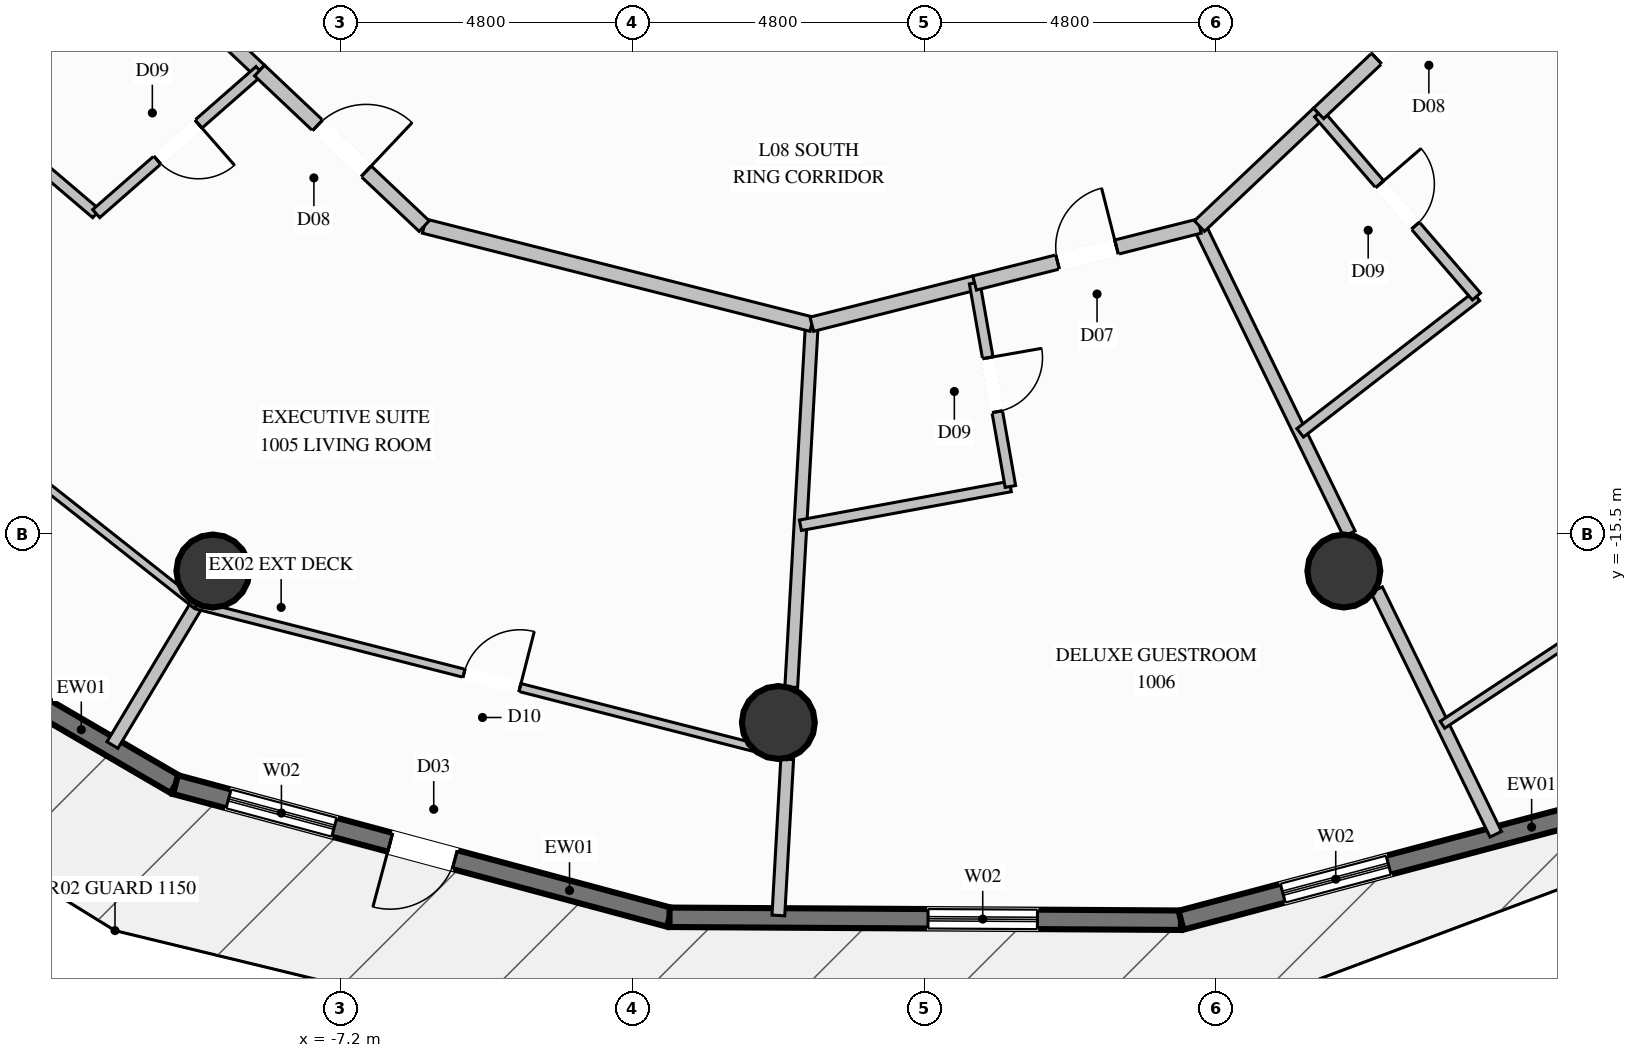
"""IFC4 building model, lengths in metres.
Left out: names, types, materials, properties, quantities, classifications, styles, units other than length and angle.
Written with IfcOpenShell. Run it as: python <this file> out.ifc"""

import sys

from ifc_helpers import new_model, si_unit, direction, frame, frame_2d, origin, origin_2d, place, context, subcontext, project, spatial, rectangle, circle, extrude, element, fill, save


model = new_model("IFC4")
c1 = context("Model", 3, precision=1e-05, world=origin(), true_north=direction((0.0, 1.0)))
c2 = subcontext(c1, "Body", "Model", "MODEL_VIEW")
j1 = project(units=[si_unit("LENGTHUNIT", "METRE"), si_unit("PLANEANGLEUNIT", "RADIAN")], contexts=[c1])
p1 = place(None, origin())
s1 = spatial("IfcSite", under=j1, at=p1, CompositionType="ELEMENT")
p2 = place(p1, origin())
s2 = spatial("IfcBuilding", under=s1, at=p2, CompositionType="ELEMENT")
p3 = place(p2, frame((0.0, 0.0, 39.2)))
s3 = spatial("IfcBuildingStorey", under=s2, at=p3, CompositionType="ELEMENT", Elevation=39.2)
for number, where, z_axis, x_axis in (
    (1, (-9.3, -16.108, 0.0), (0.0, 0.0, 1.0), (1.0, 0.0, 0.0)),
    (2, (0.0, -18.6, 0.0), (0.0, 0.0, 1.0), (1.0, 0.0, 0.0)),
    (3, (9.3, -16.108, 0.0), (0.0, 0.0, 1.0), (1.0, 0.0, 0.0)),
):
    element("IfcColumn", number, at=place(p3, frame(where, z_axis=z_axis, x_axis=x_axis)), inside=s3, PredefinedType="COLUMN", context=c2, shape_type="SweptSolid", body=[
        extrude(circle(Radius=0.6, at=origin_2d()), origin(), (0.0, 0.0, 1.0), 3.6),
    ])
p4 = place(p3, frame((-9.915, -19.621, 0.0), z_axis=(0.0, 0.0, 1.0), x_axis=(-0.864004822612, 0.503483531512, 0.0)))
e4 = element("IfcWall", 4, at=p4, inside=s3, PredefinedType="SOLIDWALL", context=c2, shape_type="SweptSolid", body=[
    extrude(rectangle(XDim=8.149, YDim=0.32, at=frame_2d((4.075, 0.0))), origin(), (0.0, 0.0, 1.0), 3.34),
])
p5 = place(p4, frame((3.836, 0.0, 0.35)))
e5 = element("IfcOpeningElement", 5, at=p5, cuts=e4, PredefinedType="OPENING", context=c2, shape_type="SweptSolid", body=[
    extrude(rectangle(XDim=1.8, YDim=2.6, at=frame_2d((0.9, 1.3))), frame((0.0, 0.17, 0.0), z_axis=(0.0, -1.0, 0.0), x_axis=(1.0, 0.0, 0.0)), (0.0, 0.0, 1.0), 0.34),
])
p6 = place(p3, frame((-1.79, -21.803, 0.0), z_axis=(0.0, 0.0, 1.0), x_axis=(-0.965783113011, 0.259351072145, 0.0)))
e6 = element("IfcWall", 6, at=p6, inside=s3, PredefinedType="SOLIDWALL", context=c2, shape_type="SweptSolid", body=[
    extrude(rectangle(XDim=8.413, YDim=0.32, at=frame_2d((4.207, 0.0))), origin(), (0.0, 0.0, 1.0), 3.34),
])
p7 = place(p6, frame((5.709, 0.0, 0.35)))
e7 = element("IfcOpeningElement", 7, at=p7, cuts=e6, PredefinedType="OPENING", context=c2, shape_type="SweptSolid", body=[
    extrude(rectangle(XDim=1.8, YDim=2.6, at=frame_2d((0.9, 1.3))), frame((0.0, 0.17, 0.0), z_axis=(0.0, -1.0, 0.0), x_axis=(1.0, 0.0, 0.0)), (0.0, 0.0, 1.0), 0.34),
])
p8 = place(p6, frame((3.656, 0.0, 0.0)))
e8 = element("IfcOpeningElement", 8, at=p8, cuts=e6, PredefinedType="OPENING", context=c2, shape_type="SweptSolid", body=[
    extrude(rectangle(XDim=1.1, YDim=2.2, at=frame_2d((0.55, 1.1))), frame((0.0, 0.17, 0.0), z_axis=(0.0, -1.0, 0.0), x_axis=(1.0, 0.0, 0.0)), (0.0, 0.0, 1.0), 0.34),
])
p9 = place(p3, frame((6.622, -21.851, 0.0), z_axis=(0.0, 0.0, 1.0), x_axis=(-0.999983655859, 0.005717343284, 0.0)))
e9 = element("IfcWall", 9, at=p9, inside=s3, PredefinedType="SOLIDWALL", context=c2, shape_type="SweptSolid", body=[
    extrude(rectangle(XDim=8.412, YDim=0.32, at=frame_2d((4.206, 0.0))), origin(), (0.0, 0.0, 1.0), 3.34),
])
p10 = place(p9, frame((2.361, 0.0, 0.35)))
e10 = element("IfcOpeningElement", 10, at=p10, cuts=e9, PredefinedType="OPENING", context=c2, shape_type="SweptSolid", body=[
    extrude(rectangle(XDim=1.8, YDim=2.6, at=frame_2d((0.9, 1.3))), frame((0.0, 0.17, 0.0), z_axis=(0.0, -1.0, 0.0), x_axis=(1.0, 0.0, 0.0)), (0.0, 0.0, 1.0), 0.34),
])
p11 = place(p3, frame((14.499, -19.76, 0.0), z_axis=(0.0, 0.0, 1.0), x_axis=(-0.966523209468, -0.256579199389, 0.0)))
e11 = element("IfcWall", 11, at=p11, inside=s3, PredefinedType="SOLIDWALL", context=c2, shape_type="SweptSolid", body=[
    extrude(rectangle(XDim=8.15, YDim=0.32, at=frame_2d((4.075, 0.0))), origin(), (0.0, 0.0, 1.0), 3.34),
])
p12 = place(p11, frame((4.617, 0.0, 0.35)))
e12 = element("IfcOpeningElement", 12, at=p12, cuts=e11, PredefinedType="OPENING", context=c2, shape_type="SweptSolid", body=[
    extrude(rectangle(XDim=1.8, YDim=2.6, at=frame_2d((0.9, 1.3))), frame((0.0, 0.17, 0.0), z_axis=(0.0, -1.0, 0.0), x_axis=(1.0, 0.0, 0.0)), (0.0, 0.0, 1.0), 0.34),
])
p13 = place(p3, frame((-10.492, -6.025, 0.0), z_axis=(0.0, 0.0, 1.0), x_axis=(-0.86478894661, -0.502135517387, 0.0)))
e13 = element("IfcWall", 13, at=p13, inside=s3, PredefinedType="PARTITIONING", context=c2, shape_type="SweptSolid", body=[
    extrude(rectangle(XDim=5.881, YDim=0.21, at=frame_2d((2.94, 0.0))), origin(), (0.0, 0.0, 1.0), 2.709),
])
p14 = place(p3, frame((0.55, -12.05, 0.0), z_axis=(0.0, 0.0, 1.0), x_axis=(-0.056567082794, -0.998398800652, 0.0)))
e14 = element("IfcWall", 14, at=p14, inside=s3, PredefinedType="PARTITIONING", context=c2, shape_type="SweptSolid", body=[
    extrude(rectangle(XDim=5.978, YDim=0.21, at=frame_2d((2.989, 0.0))), origin(), (0.0, 0.0, 1.0), 3.34),
])
p15 = place(p3, frame((0.145, -19.203, 0.0), z_axis=(0.0, 0.0, 1.0), x_axis=(-0.056336717454, -0.998411825985, 0.0)))
e15 = element("IfcWall", 15, at=p15, inside=s3, PredefinedType="PARTITIONING", context=c2, shape_type="SweptSolid", body=[
    extrude(rectangle(XDim=2.574, YDim=0.21, at=frame_2d((1.287, 0.0))), origin(), (0.0, 0.0, 1.0), 3.34),
])
p16 = place(p3, frame((6.925, -10.436, 0.0), z_axis=(0.0, 0.0, 1.0), x_axis=(0.437992797289, -0.898978481123, 0.0)))
e16 = element("IfcWall", 16, at=p16, inside=s3, PredefinedType="PARTITIONING", context=c2, shape_type="SweptSolid", body=[
    extrude(rectangle(XDim=5.628, YDim=0.21, at=frame_2d((2.814, 0.0))), origin(), (0.0, 0.0, 1.0), 2.709),
])
p17 = place(p3, frame((9.839, -16.415, 0.0), z_axis=(0.0, 0.0, 1.0), x_axis=(0.438066667733, -0.898942486826, 0.0)))
e17 = element("IfcWall", 17, at=p17, inside=s3, PredefinedType="PARTITIONING", context=c2, shape_type="SweptSolid", body=[
    extrude(rectangle(XDim=4.474, YDim=0.21, at=frame_2d((2.237, 0.0))), origin(), (0.0, 0.0, 1.0), 3.34),
])
p18 = place(p3, frame((-10.492, -6.025, 0.0), z_axis=(0.0, 0.0, 1.0), x_axis=(0.726651583854, -0.687006168591, 0.0)))
e18 = element("IfcWall", 18, at=p18, inside=s3, PredefinedType="PARTITIONING", context=c2, shape_type="SweptSolid", body=[
    extrude(rectangle(XDim=2.697, YDim=0.24, at=frame_2d((1.349, 0.0))), origin(), (0.0, 0.0, 1.0), 3.34),
])
p19 = place(p3, frame((-13.863, -7.982, 0.0), z_axis=(0.0, 0.0, 1.0), x_axis=(0.761713672962, -0.647913790888, 0.0)))
e19 = element("IfcWall", 19, at=p19, inside=s3, PredefinedType="PLUMBINGWALL", context=c2, shape_type="SweptSolid", body=[
    extrude(rectangle(XDim=3.471, YDim=0.175, at=frame_2d((1.736, 0.0))), origin(), (0.0, 0.0, 1.0), 3.34),
])
p20 = place(p3, frame((-8.532, -7.878, 0.0), z_axis=(0.0, 0.0, 1.0), x_axis=(-0.752314103663, -0.658804591233, 0.0)))
e20 = element("IfcWall", 20, at=p20, inside=s3, PredefinedType="PLUMBINGWALL", context=c2, shape_type="SweptSolid", body=[
    extrude(rectangle(XDim=3.572, YDim=0.175, at=frame_2d((1.786, 0.0))), origin(), (0.0, 0.0, 1.0), 3.34),
])
p21 = place(p20, frame((1.336, 0.0, 0.0)))
e21 = element("IfcOpeningElement", 21, at=p21, cuts=e20, PredefinedType="OPENING", context=c2, shape_type="SweptSolid", body=[
    extrude(rectangle(XDim=0.9, YDim=2.1, at=frame_2d((0.45, 1.05))), frame((0.0, 0.098, 0.0), z_axis=(0.0, -1.0, 0.0), x_axis=(1.0, 0.0, 0.0)), (0.0, 0.0, 1.0), 0.195),
])
p22 = place(p3, frame((-9.568, -16.666, 0.0), z_axis=(0.0, 0.0, 1.0), x_axis=(-0.514883110299, -0.857260393771, 0.0)))
e22 = element("IfcWall", 22, at=p22, inside=s3, PredefinedType="PARTITIONING", context=c2, shape_type="SweptSolid", body=[
    extrude(rectangle(XDim=2.688, YDim=0.21, at=frame_2d((1.344, 0.0))), origin(), (0.0, 0.0, 1.0), 3.34),
])
p23 = place(p3, frame((-5.825, -10.436, 0.0), z_axis=(0.0, 0.0, 1.0), x_axis=(0.969413132073, -0.245434674331, 0.0)))
e23 = element("IfcWall", 23, at=p23, inside=s3, PredefinedType="PARTITIONING", context=c2, shape_type="SweptSolid", body=[
    extrude(rectangle(XDim=6.576, YDim=0.24, at=frame_2d((3.288, 0.0))), origin(), (0.0, 0.0, 1.0), 3.34),
])
p24 = place(p3, frame((-8.532, -7.878, 0.0), z_axis=(0.0, 0.0, 1.0), x_axis=(0.726816794063, -0.686831382413, 0.0)))
e24 = element("IfcWall", 24, at=p24, inside=s3, PredefinedType="PARTITIONING", context=c2, shape_type="SweptSolid", body=[
    extrude(rectangle(XDim=3.725, YDim=0.24, at=frame_2d((1.862, 0.0))), origin(), (0.0, 0.0, 1.0), 3.34),
])
p25 = place(p24, frame((1.312, 0.0, 0.0)))
e25 = element("IfcOpeningElement", 25, at=p25, cuts=e24, PredefinedType="OPENING", context=c2, shape_type="SweptSolid", body=[
    extrude(rectangle(XDim=1.1, YDim=2.3, at=frame_2d((0.55, 1.15))), frame((0.0, 0.13, 0.0), z_axis=(0.0, -1.0, 0.0), x_axis=(1.0, 0.0, 0.0)), (0.0, 0.0, 1.0), 0.26),
])
p26 = place(p3, frame((-17.729, -10.227, 0.0), z_axis=(0.0, 0.0, 1.0), x_axis=(0.785062483649, -0.61941657773, 0.0)))
e26 = element("IfcWall", 26, at=p26, inside=s3, PredefinedType="PARTITIONING", context=c2, shape_type="SweptSolid", body=[
    extrude(rectangle(XDim=10.395, YDim=0.135, at=frame_2d((5.198, 0.0))), origin(), (0.0, 0.0, 1.0), 2.792),
])
p27 = place(p26, frame((4.723, 0.0, 0.0)))
e27 = element("IfcOpeningElement", 27, at=p27, cuts=e26, PredefinedType="OPENING", context=c2, shape_type="SweptSolid", body=[
    extrude(rectangle(XDim=0.95, YDim=2.1, at=frame_2d((0.475, 1.05))), frame((0.0, 0.078, 0.0), z_axis=(0.0, -1.0, 0.0), x_axis=(1.0, 0.0, 0.0)), (0.0, 0.0, 1.0), 0.155),
])
p28 = place(p3, frame((-9.568, -16.666, 0.0), z_axis=(0.0, 0.0, 1.0), x_axis=(0.968894117995, -0.247475631354, 0.0)))
e28 = element("IfcWall", 28, at=p28, inside=s3, PredefinedType="PARTITIONING", context=c2, shape_type="SweptSolid", body=[
    extrude(rectangle(XDim=10.029, YDim=0.135, at=frame_2d((5.015, 0.0))), origin(), (0.0, 0.0, 1.0), 2.792),
])
p29 = place(p28, frame((4.539, 0.0, 0.0)))
e29 = element("IfcOpeningElement", 29, at=p29, cuts=e28, PredefinedType="OPENING", context=c2, shape_type="SweptSolid", body=[
    extrude(rectangle(XDim=0.95, YDim=2.1, at=frame_2d((0.475, 1.05))), frame((0.0, 0.078, 0.0), z_axis=(0.0, -1.0, 0.0), x_axis=(1.0, 0.0, 0.0)), (0.0, 0.0, 1.0), 0.155),
])
p30 = place(p3, frame((0.55, -12.05, 0.0), z_axis=(0.0, 0.0, 1.0), x_axis=(0.969415576054, 0.245425020941, 0.0)))
e30 = element("IfcWall", 30, at=p30, inside=s3, PredefinedType="PARTITIONING", context=c2, shape_type="SweptSolid", body=[
    extrude(rectangle(XDim=2.762, YDim=0.24, at=frame_2d((1.381, 0.0))), origin(), (0.0, 0.0, 1.0), 3.34),
])
p31 = place(p3, frame((0.363, -15.356, 0.0), z_axis=(0.0, 0.0, 1.0), x_axis=(0.983357535979, 0.18168091929, 0.0)))
e31 = element("IfcWall", 31, at=p31, inside=s3, PredefinedType="PLUMBINGWALL", context=c2, shape_type="SweptSolid", body=[
    extrude(rectangle(XDim=3.511, YDim=0.175, at=frame_2d((1.756, 0.0))), origin(), (0.0, 0.0, 1.0), 3.34),
])
p32 = place(p3, frame((3.228, -11.372, 0.0), z_axis=(0.0, 0.0, 1.0), x_axis=(0.173051440514, -0.984912787477, 0.0)))
e32 = element("IfcWall", 32, at=p32, inside=s3, PredefinedType="PLUMBINGWALL", context=c2, shape_type="SweptSolid", body=[
    extrude(rectangle(XDim=3.397, YDim=0.175, at=frame_2d((1.699, 0.0))), origin(), (0.0, 0.0, 1.0), 3.34),
])
p33 = place(p32, frame((1.249, 0.0, 0.0)))
e33 = element("IfcOpeningElement", 33, at=p33, cuts=e32, PredefinedType="OPENING", context=c2, shape_type="SweptSolid", body=[
    extrude(rectangle(XDim=0.9, YDim=2.1, at=frame_2d((0.45, 1.05))), frame((0.0, 0.098, 0.0), z_axis=(0.0, -1.0, 0.0), x_axis=(1.0, 0.0, 0.0)), (0.0, 0.0, 1.0), 0.195),
])
p34 = place(p3, frame((3.228, -11.372, 0.0), z_axis=(0.0, 0.0, 1.0), x_axis=(0.969411361696, 0.245441666826, 0.0)))
e34 = element("IfcWall", 34, at=p34, inside=s3, PredefinedType="PARTITIONING", context=c2, shape_type="SweptSolid", body=[
    extrude(rectangle(XDim=3.814, YDim=0.24, at=frame_2d((1.907, 0.0))), origin(), (0.0, 0.0, 1.0), 3.34),
])
p35 = place(p34, frame((1.407, 0.0, 0.0)))
e35 = element("IfcOpeningElement", 35, at=p35, cuts=e34, PredefinedType="OPENING", context=c2, shape_type="SweptSolid", body=[
    extrude(rectangle(XDim=1.0, YDim=2.2, at=frame_2d((0.5, 1.1))), frame((0.0, 0.13, 0.0), z_axis=(0.0, -1.0, 0.0), x_axis=(1.0, 0.0, 0.0)), (0.0, 0.0, 1.0), 0.26),
])
p36 = place(p3, frame((6.925, -10.436, 0.0), z_axis=(0.0, 0.0, 1.0), x_axis=(0.726651583854, 0.687006168591, 0.0)))
e36 = element("IfcWall", 36, at=p36, inside=s3, PredefinedType="PARTITIONING", context=c2, shape_type="SweptSolid", body=[
    extrude(rectangle(XDim=2.697, YDim=0.24, at=frame_2d((1.349, 0.0))), origin(), (0.0, 0.0, 1.0), 3.34),
])
p37 = place(p3, frame((8.582, -13.836, 0.0), z_axis=(0.0, 0.0, 1.0), x_axis=(0.791038798836, 0.611765983638, 0.0)))
e37 = element("IfcWall", 37, at=p37, inside=s3, PredefinedType="PLUMBINGWALL", context=c2, shape_type="SweptSolid", body=[
    extrude(rectangle(XDim=3.665, YDim=0.175, at=frame_2d((1.833, 0.0))), origin(), (0.0, 0.0, 1.0), 3.34),
])
p38 = place(p3, frame((8.885, -8.583, 0.0), z_axis=(0.0, 0.0, 1.0), x_axis=(0.652978495016, -0.757376448701, 0.0)))
e38 = element("IfcWall", 38, at=p38, inside=s3, PredefinedType="PLUMBINGWALL", context=c2, shape_type="SweptSolid", body=[
    extrude(rectangle(XDim=3.976, YDim=0.175, at=frame_2d((1.988, 0.0))), origin(), (0.0, 0.0, 1.0), 3.34),
])
p39 = place(p38, frame((1.538, 0.0, 0.0)))
e39 = element("IfcOpeningElement", 39, at=p39, cuts=e38, PredefinedType="OPENING", context=c2, shape_type="SweptSolid", body=[
    extrude(rectangle(XDim=0.9, YDim=2.1, at=frame_2d((0.45, 1.05))), frame((0.0, 0.098, 0.0), z_axis=(0.0, -1.0, 0.0), x_axis=(1.0, 0.0, 0.0)), (0.0, 0.0, 1.0), 0.195),
])
p40 = place(p3, frame((8.885, -8.583, 0.0), z_axis=(0.0, 0.0, 1.0), x_axis=(0.726816794063, 0.686831382413, 0.0)))
e40 = element("IfcWall", 40, at=p40, inside=s3, PredefinedType="PARTITIONING", context=c2, shape_type="SweptSolid", body=[
    extrude(rectangle(XDim=3.725, YDim=0.24, at=frame_2d((1.862, 0.0))), origin(), (0.0, 0.0, 1.0), 3.34),
])
p41 = place(p40, frame((1.312, 0.0, 0.0)))
e41 = element("IfcOpeningElement", 41, at=p41, cuts=e40, PredefinedType="OPENING", context=c2, shape_type="SweptSolid", body=[
    extrude(rectangle(XDim=1.1, YDim=2.3, at=frame_2d((0.55, 1.15))), frame((0.0, 0.13, 0.0), z_axis=(0.0, -1.0, 0.0), x_axis=(1.0, 0.0, 0.0)), (0.0, 0.0, 1.0), 0.26),
])
p42 = place(p3, frame((10.922, -18.637, 0.0), z_axis=(0.0, 0.0, 1.0), x_axis=(0.834262284768, 0.551367790331, 0.0)))
e42 = element("IfcWall", 42, at=p42, inside=s3, PredefinedType="PARTITIONING", context=c2, shape_type="SweptSolid", body=[
    extrude(rectangle(XDim=12.054, YDim=0.135, at=frame_2d((6.027, 0.0))), origin(), (0.0, 0.0, 1.0), 3.34),
])
p43 = place(p42, frame((5.552, 0.0, 0.0)))
e43 = element("IfcOpeningElement", 43, at=p43, cuts=e42, PredefinedType="OPENING", context=c2, shape_type="SweptSolid", body=[
    extrude(rectangle(XDim=0.95, YDim=2.1, at=frame_2d((0.475, 1.05))), frame((0.0, 0.078, 0.0), z_axis=(0.0, -1.0, 0.0), x_axis=(1.0, 0.0, 0.0)), (0.0, 0.0, 1.0), 0.155),
])
p44 = place(p7, origin())
e44 = element("IfcWindow", 44, at=p44, inside=s3, PartitioningType="SINGLE_PANEL", PredefinedType="WINDOW", context=c2, shape_type="SweptSolid", body=[
    extrude(rectangle(XDim=1.8, YDim=2.6, at=frame_2d((0.9, 1.3))), frame((0.0, 0.03, 0.0), z_axis=(0.0, -1.0, 0.0), x_axis=(1.0, 0.0, 0.0)), (0.0, 0.0, 1.0), 0.06),
])
fill(e7, e44)
p45 = place(p8, origin())
e45 = element("IfcDoor", 45, at=p45, inside=s3, OperationType="SINGLE_SWING_RIGHT", PredefinedType="DOOR", context=c2, shape_type="SweptSolid", body=[
    extrude(rectangle(XDim=1.1, YDim=2.2, at=frame_2d((0.55, 1.1))), frame((0.0, 0.025, 0.0), z_axis=(0.0, -1.0, 0.0), x_axis=(1.0, 0.0, 0.0)), (0.0, 0.0, 1.0), 0.05),
])
fill(e8, e45)
p46 = place(p10, origin())
e46 = element("IfcWindow", 46, at=p46, inside=s3, PartitioningType="SINGLE_PANEL", PredefinedType="WINDOW", context=c2, shape_type="SweptSolid", body=[
    extrude(rectangle(XDim=1.8, YDim=2.6, at=frame_2d((0.9, 1.3))), frame((0.0, 0.03, 0.0), z_axis=(0.0, -1.0, 0.0), x_axis=(1.0, 0.0, 0.0)), (0.0, 0.0, 1.0), 0.06),
])
fill(e10, e46)
p47 = place(p12, origin())
e47 = element("IfcWindow", 47, at=p47, inside=s3, PartitioningType="SINGLE_PANEL", PredefinedType="WINDOW", context=c2, shape_type="SweptSolid", body=[
    extrude(rectangle(XDim=1.8, YDim=2.6, at=frame_2d((0.9, 1.3))), frame((0.0, 0.03, 0.0), z_axis=(0.0, -1.0, 0.0), x_axis=(1.0, 0.0, 0.0)), (0.0, 0.0, 1.0), 0.06),
])
fill(e12, e47)
p48 = place(p21, origin())
e48 = element("IfcDoor", 48, at=p48, inside=s3, OperationType="SINGLE_SWING_LEFT", PredefinedType="DOOR", context=c2, shape_type="SweptSolid", body=[
    extrude(rectangle(XDim=0.9, YDim=2.1, at=frame_2d((0.45, 1.05))), frame((0.0, 0.025, 0.0), z_axis=(0.0, -1.0, 0.0), x_axis=(1.0, 0.0, 0.0)), (0.0, 0.0, 1.0), 0.05),
])
fill(e21, e48)
p49 = place(p25, origin())
e49 = element("IfcDoor", 49, at=p49, inside=s3, OperationType="SINGLE_SWING_RIGHT", PredefinedType="DOOR", context=c2, shape_type="SweptSolid", body=[
    extrude(rectangle(XDim=1.1, YDim=2.3, at=frame_2d((0.55, 1.15))), frame((0.0, 0.025, 0.0), z_axis=(0.0, -1.0, 0.0), x_axis=(1.0, 0.0, 0.0)), (0.0, 0.0, 1.0), 0.05),
])
fill(e25, e49)
p50 = place(p29, origin())
e50 = element("IfcDoor", 50, at=p50, inside=s3, OperationType="SINGLE_SWING_RIGHT", PredefinedType="DOOR", context=c2, shape_type="SweptSolid", body=[
    extrude(rectangle(XDim=0.95, YDim=2.1, at=frame_2d((0.475, 1.05))), frame((0.0, 0.025, 0.0), z_axis=(0.0, -1.0, 0.0), x_axis=(1.0, 0.0, 0.0)), (0.0, 0.0, 1.0), 0.05),
])
fill(e29, e50)
p51 = place(p33, origin())
e51 = element("IfcDoor", 51, at=p51, inside=s3, OperationType="SINGLE_SWING_LEFT", PredefinedType="DOOR", context=c2, shape_type="SweptSolid", body=[
    extrude(rectangle(XDim=0.9, YDim=2.1, at=frame_2d((0.45, 1.05))), frame((0.0, 0.025, 0.0), z_axis=(0.0, -1.0, 0.0), x_axis=(1.0, 0.0, 0.0)), (0.0, 0.0, 1.0), 0.05),
])
fill(e33, e51)
p52 = place(p35, origin())
e52 = element("IfcDoor", 52, at=p52, inside=s3, OperationType="SINGLE_SWING_RIGHT", PredefinedType="DOOR", context=c2, shape_type="SweptSolid", body=[
    extrude(rectangle(XDim=1.0, YDim=2.2, at=frame_2d((0.5, 1.1))), frame((0.0, 0.025, 0.0), z_axis=(0.0, -1.0, 0.0), x_axis=(1.0, 0.0, 0.0)), (0.0, 0.0, 1.0), 0.05),
])
fill(e35, e52)
p53 = place(p39, origin())
e53 = element("IfcDoor", 53, at=p53, inside=s3, OperationType="SINGLE_SWING_LEFT", PredefinedType="DOOR", context=c2, shape_type="SweptSolid", body=[
    extrude(rectangle(XDim=0.9, YDim=2.1, at=frame_2d((0.45, 1.05))), frame((0.0, 0.025, 0.0), z_axis=(0.0, -1.0, 0.0), x_axis=(1.0, 0.0, 0.0)), (0.0, 0.0, 1.0), 0.05),
])
fill(e39, e53)
p54 = place(p41, origin())
e54 = element("IfcDoor", 54, at=p54, inside=s3, OperationType="SINGLE_SWING_RIGHT", PredefinedType="DOOR", context=c2, shape_type="SweptSolid", body=[
    extrude(rectangle(XDim=1.1, YDim=2.3, at=frame_2d((0.55, 1.15))), frame((0.0, 0.025, 0.0), z_axis=(0.0, -1.0, 0.0), x_axis=(1.0, 0.0, 0.0)), (0.0, 0.0, 1.0), 0.05),
])
fill(e41, e54)
save(model, sys.argv[1])
